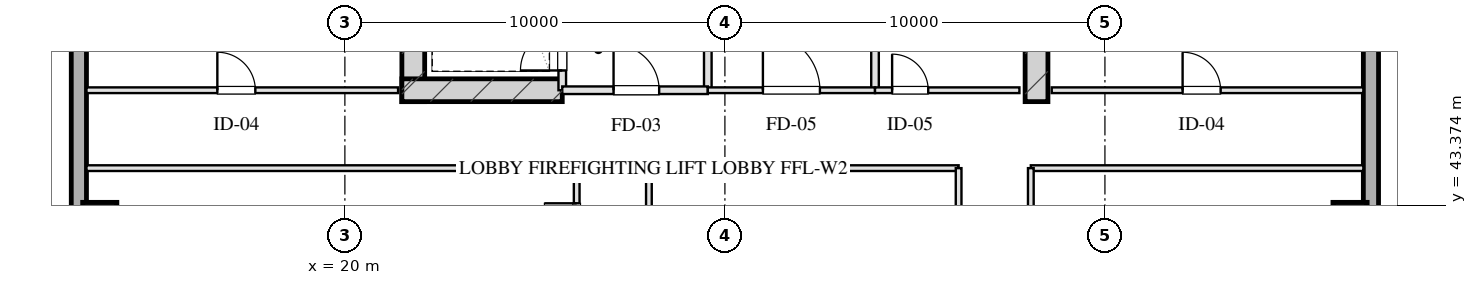
"""IFC4 building model, lengths in metres.
Left out: names, types, materials, properties, quantities, classifications, styles, units other than length and angle.
Written with IfcOpenShell. Run it as: python <this file> out.ifc"""

import sys

from ifc_helpers import new_model, si_unit, direction, frame, frame_2d, origin, origin_2d, place, context, subcontext, project, spatial, rectangle, hollow_rectangle, extrude, element, fill, save


model = new_model("IFC4")
c1 = context("Model", 3, precision=1e-05, world=origin(), true_north=direction((0.0, 1.0)))
c2 = subcontext(c1, "Body", "Model", "MODEL_VIEW")
j1 = project(units=[si_unit("LENGTHUNIT", "METRE"), si_unit("PLANEANGLEUNIT", "RADIAN")], contexts=[c1])
p1 = place(None, origin())
s1 = spatial("IfcSite", under=j1, at=p1, CompositionType="ELEMENT")
p2 = place(p1, origin())
s2 = spatial("IfcBuilding", under=s1, at=p2, CompositionType="ELEMENT")
p3 = place(p2, frame((0.0, 0.0, 177.1)))
s3 = spatial("IfcBuildingStorey", under=s2, at=p3, CompositionType="ELEMENT", Elevation=177.1)
for number, where, z_axis, x_axis in (
    (1, (21.8, 46.1, 0.0), (0.0, 0.0, 1.0), (0.0, 1.0, 0.0)),
    (2, (38.2, 46.1, 0.0), (0.0, 0.0, 1.0), (0.0, 1.0, 0.0)),
):
    element("IfcWall", number, at=place(p3, frame(where, z_axis=z_axis, x_axis=x_axis)), inside=s3, PredefinedType="SHEAR", context=c2, shape_type="SweptSolid", body=[
        extrude(rectangle(XDim=9.48, YDim=0.6, at=frame_2d((4.74, 0.0))), origin(), (0.0, 0.0, 1.0), 3.45),
    ])
p4 = place(p3, frame((21.5, 46.4, 0.0), z_axis=(0.0, 0.0, 1.0), x_axis=(1.0, 0.0, 0.0)))
e3 = element("IfcWall", 3, at=p4, inside=s3, PredefinedType="SHEAR", context=c2, shape_type="SweptSolid", body=[
    extrude(rectangle(XDim=4.22, YDim=0.6, at=frame_2d((2.11, 0.0))), origin(), (0.0, 0.0, 1.0), 3.45),
])
for number, where, z_axis, x_axis in (
    (4, (13.55, 43.0, 0.0), (0.0, 0.0, 1.0), (1.0, 0.0, 0.0)),
    (5, (46.45, 43.0, 0.0), (0.0, 0.0, 1.0), (1.0, 0.0, 0.0)),
):
    element("IfcColumn", number, at=place(p3, frame(where, z_axis=z_axis, x_axis=x_axis)), inside=s3, PredefinedType="COLUMN", context=c2, shape_type="SweptSolid", body=[
        extrude(hollow_rectangle(XDim=0.9, YDim=0.9, WallThickness=0.032, at=origin_2d()), origin(), (0.0, 0.0, 1.0), 3.451),
    ])
p5 = place(p3, frame((13.0, 10.8, 0.0), z_axis=(0.0, 0.0, 1.0), x_axis=(0.0, 1.0, 0.0)))
e6 = element("IfcWall", 6, at=p5, inside=s3, PredefinedType="SOLIDWALL", context=c2, shape_type="SweptSolid", body=[
    extrude(rectangle(XDim=46.4, YDim=0.4, at=frame_2d((23.2, 0.0))), origin(), (0.0, 0.0, 1.0), 2.61),
])
p6 = place(p5, frame((15.75, 0.0, 0.75)))
e7 = element("IfcOpeningElement", 7, at=p6, cuts=e6, PredefinedType="OPENING", context=c2, shape_type="SweptSolid", body=[
    extrude(rectangle(XDim=2.1, YDim=1.46, at=frame_2d((1.05, 0.73))), frame((0.0, 0.21, 0.0), z_axis=(0.0, -1.0, 0.0), x_axis=(1.0, 0.0, 0.0)), (0.0, 0.0, 1.0), 0.42),
])
p7 = place(p5, frame((19.55, 0.0, 0.75)))
e8 = element("IfcOpeningElement", 8, at=p7, cuts=e6, PredefinedType="OPENING", context=c2, shape_type="SweptSolid", body=[
    extrude(rectangle(XDim=2.1, YDim=1.46, at=frame_2d((1.05, 0.73))), frame((0.0, 0.21, 0.0), z_axis=(0.0, -1.0, 0.0), x_axis=(1.0, 0.0, 0.0)), (0.0, 0.0, 1.0), 0.42),
])
p8 = place(p5, frame((28.45, 0.0, 0.0)))
e9 = element("IfcOpeningElement", 9, at=p8, cuts=e6, PredefinedType="OPENING", context=c2, shape_type="SweptSolid", body=[
    extrude(rectangle(XDim=1.1, YDim=2.15, at=frame_2d((0.55, 1.075))), frame((0.0, 0.21, 0.0), z_axis=(0.0, -1.0, 0.0), x_axis=(1.0, 0.0, 0.0)), (0.0, 0.0, 1.0), 0.42),
])
p9 = place(p3, frame((47.0, 57.2, 0.0), z_axis=(0.0, 0.0, 1.0), x_axis=(0.0, -1.0, 0.0)))
e10 = element("IfcWall", 10, at=p9, inside=s3, PredefinedType="SOLIDWALL", context=c2, shape_type="SweptSolid", body=[
    extrude(rectangle(XDim=46.4, YDim=0.4, at=frame_2d((23.2, 0.0))), origin(), (0.0, 0.0, 1.0), 2.61),
])
p10 = place(p9, frame((28.55, 0.0, 0.75)))
e11 = element("IfcOpeningElement", 11, at=p10, cuts=e10, PredefinedType="OPENING", context=c2, shape_type="SweptSolid", body=[
    extrude(rectangle(XDim=2.1, YDim=1.46, at=frame_2d((1.05, 0.73))), frame((0.0, 0.21, 0.0), z_axis=(0.0, -1.0, 0.0), x_axis=(1.0, 0.0, 0.0)), (0.0, 0.0, 1.0), 0.42),
])
p11 = place(p9, frame((24.75, 0.0, 0.75)))
e12 = element("IfcOpeningElement", 12, at=p11, cuts=e10, PredefinedType="OPENING", context=c2, shape_type="SweptSolid", body=[
    extrude(rectangle(XDim=2.1, YDim=1.46, at=frame_2d((1.05, 0.73))), frame((0.0, 0.21, 0.0), z_axis=(0.0, -1.0, 0.0), x_axis=(1.0, 0.0, 0.0)), (0.0, 0.0, 1.0), 0.42),
])
p12 = place(p9, frame((18.25, 0.0, 0.0)))
e13 = element("IfcOpeningElement", 13, at=p12, cuts=e10, PredefinedType="OPENING", context=c2, shape_type="SweptSolid", body=[
    extrude(rectangle(XDim=1.1, YDim=2.15, at=frame_2d((0.55, 1.075))), frame((0.0, 0.21, 0.0), z_axis=(0.0, -1.0, 0.0), x_axis=(1.0, 0.0, 0.0)), (0.0, 0.0, 1.0), 0.42),
])
p13 = place(p3, frame((25.72, 46.4, 0.0), z_axis=(0.0, 0.0, 1.0), x_axis=(0.0, 1.0, 0.0)))
e14 = element("IfcWall", 14, at=p13, inside=s3, PredefinedType="PARTITIONING", context=c2, shape_type="SweptSolid", body=[
    extrude(rectangle(XDim=1.9, YDim=0.2, at=frame_2d((0.95, 0.0))), origin(), (0.0, 0.0, 1.0), 3.175),
])
p14 = place(p13, frame((0.52, 0.0, 0.0)))
e15 = element("IfcOpeningElement", 15, at=p14, cuts=e14, PredefinedType="OPENING", context=c2, shape_type="SweptSolid", body=[
    extrude(rectangle(XDim=1.1, YDim=2.05, at=frame_2d((0.55, 1.025))), frame((0.0, 0.11, 0.0), z_axis=(0.0, -1.0, 0.0), x_axis=(1.0, 0.0, 0.0)), (0.0, 0.0, 1.0), 0.22),
])
p15 = place(p3, frame((29.55, 46.4, 0.0), z_axis=(0.0, 0.0, 1.0), x_axis=(0.0, 1.0, 0.0)))
e16 = element("IfcWall", 16, at=p15, inside=s3, PredefinedType="PARTITIONING", context=c2, shape_type="SweptSolid", body=[
    extrude(rectangle(XDim=8.43, YDim=0.2, at=frame_2d((4.215, 0.0))), origin(), (0.0, 0.0, 1.0), 3.175),
])
p16 = place(p3, frame((25.72, 46.4, 0.0), z_axis=(0.0, 0.0, 1.0), x_axis=(1.0, 0.0, 0.0)))
e17 = element("IfcWall", 17, at=p16, inside=s3, PredefinedType="PARTITIONING", context=c2, shape_type="SweptSolid", body=[
    extrude(rectangle(XDim=3.83, YDim=0.2, at=frame_2d((1.915, 0.0))), origin(), (0.0, 0.0, 1.0), 3.175),
])
p17 = place(p16, frame((1.35, 0.0, 0.0)))
e18 = element("IfcOpeningElement", 18, at=p17, cuts=e17, PredefinedType="OPENING", context=c2, shape_type="SweptSolid", body=[
    extrude(rectangle(XDim=1.2, YDim=2.05, at=frame_2d((0.6, 1.025))), frame((0.0, 0.11, 0.0), z_axis=(0.0, -1.0, 0.0), x_axis=(1.0, 0.0, 0.0)), (0.0, 0.0, 1.0), 0.22),
])
p18 = place(p3, frame((33.95, 46.4, 0.0), z_axis=(0.0, 0.0, 1.0), x_axis=(0.0, 1.0, 0.0)))
e19 = element("IfcWall", 19, at=p18, inside=s3, PredefinedType="PARTITIONING", context=c2, shape_type="SweptSolid", body=[
    extrude(rectangle(XDim=8.43, YDim=0.2, at=frame_2d((4.215, 0.0))), origin(), (0.0, 0.0, 1.0), 3.175),
])
p19 = place(p3, frame((29.55, 46.4, 0.0), z_axis=(0.0, 0.0, 1.0), x_axis=(1.0, 0.0, 0.0)))
e20 = element("IfcWall", 20, at=p19, inside=s3, PredefinedType="PARTITIONING", context=c2, shape_type="SweptSolid", body=[
    extrude(rectangle(XDim=4.4, YDim=0.15, at=frame_2d((2.2, 0.0))), origin(), (0.0, 0.0, 1.0), 3.175),
])
p20 = place(p19, frame((1.45, 0.0, 0.0)))
e21 = element("IfcOpeningElement", 21, at=p20, cuts=e20, PredefinedType="OPENING", context=c2, shape_type="SweptSolid", body=[
    extrude(rectangle(XDim=1.5, YDim=2.05, at=frame_2d((0.75, 1.025))), frame((0.0, 0.085, 0.0), z_axis=(0.0, -1.0, 0.0), x_axis=(1.0, 0.0, 0.0)), (0.0, 0.0, 1.0), 0.17),
])
p21 = place(p3, frame((33.95, 46.4, 0.0), z_axis=(0.0, 0.0, 1.0), x_axis=(1.0, 0.0, 0.0)))
e22 = element("IfcWall", 22, at=p21, inside=s3, PredefinedType="PARTITIONING", context=c2, shape_type="SweptSolid", body=[
    extrude(rectangle(XDim=3.8, YDim=0.15, at=frame_2d((1.9, 0.0))), origin(), (0.0, 0.0, 1.0), 3.175),
])
p22 = place(p21, frame((0.45, 0.0, 0.0)))
e23 = element("IfcOpeningElement", 23, at=p22, cuts=e22, PredefinedType="OPENING", context=c2, shape_type="SweptSolid", body=[
    extrude(rectangle(XDim=0.95, YDim=2.05, at=frame_2d((0.475, 1.025))), frame((0.0, 0.085, 0.0), z_axis=(0.0, -1.0, 0.0), x_axis=(1.0, 0.0, 0.0)), (0.0, 0.0, 1.0), 0.17),
])
p23 = place(p3, frame((13.2, 46.4, 0.0), z_axis=(0.0, 0.0, 1.0), x_axis=(1.0, 0.0, 0.0)))
e24 = element("IfcWall", 24, at=p23, inside=s3, PredefinedType="PARTITIONING", context=c2, shape_type="SweptSolid", body=[
    extrude(rectangle(XDim=8.2, YDim=0.15, at=frame_2d((4.1, 0.0))), origin(), (0.0, 0.0, 1.0), 3.175),
])
p24 = place(p23, frame((3.444, 0.0, 0.0)))
e25 = element("IfcOpeningElement", 25, at=p24, cuts=e24, PredefinedType="OPENING", context=c2, shape_type="SweptSolid", body=[
    extrude(rectangle(XDim=1.0, YDim=2.05, at=frame_2d((0.5, 1.025))), frame((0.0, 0.085, 0.0), z_axis=(0.0, -1.0, 0.0), x_axis=(1.0, 0.0, 0.0)), (0.0, 0.0, 1.0), 0.17),
])
p25 = place(p3, frame((38.6, 46.4, 0.0), z_axis=(0.0, 0.0, 1.0), x_axis=(1.0, 0.0, 0.0)))
e26 = element("IfcWall", 26, at=p25, inside=s3, PredefinedType="PARTITIONING", context=c2, shape_type="SweptSolid", body=[
    extrude(rectangle(XDim=8.2, YDim=0.15, at=frame_2d((4.1, 0.0))), origin(), (0.0, 0.0, 1.0), 3.175),
])
p26 = place(p25, frame((3.444, 0.0, 0.0)))
e27 = element("IfcOpeningElement", 27, at=p26, cuts=e26, PredefinedType="OPENING", context=c2, shape_type="SweptSolid", body=[
    extrude(rectangle(XDim=1.0, YDim=2.05, at=frame_2d((0.5, 1.025))), frame((0.0, 0.085, 0.0), z_axis=(0.0, -1.0, 0.0), x_axis=(1.0, 0.0, 0.0)), (0.0, 0.0, 1.0), 0.17),
])
p27 = place(p3, frame((13.2, 44.35, 0.0), z_axis=(0.0, 0.0, 1.0), x_axis=(1.0, 0.0, 0.0)))
e28 = element("IfcWall", 28, at=p27, inside=s3, PredefinedType="PARTITIONING", context=c2, shape_type="SweptSolid", body=[
    extrude(rectangle(XDim=12.9, YDim=0.15, at=frame_2d((6.45, 0.0))), origin(), (0.0, 0.0, 1.0), 3.175),
])
p28 = place(p3, frame((28.0, 44.35, 0.0), z_axis=(0.0, 0.0, 1.0), x_axis=(1.0, 0.0, 0.0)))
e29 = element("IfcWall", 29, at=p28, inside=s3, PredefinedType="PARTITIONING", context=c2, shape_type="SweptSolid", body=[
    extrude(rectangle(XDim=8.15, YDim=0.15, at=frame_2d((4.075, 0.0))), origin(), (0.0, 0.0, 1.0), 3.175),
])
p29 = place(p3, frame((38.05, 44.35, 0.0), z_axis=(0.0, 0.0, 1.0), x_axis=(1.0, 0.0, 0.0)))
e30 = element("IfcWall", 30, at=p29, inside=s3, PredefinedType="PARTITIONING", context=c2, shape_type="SweptSolid", body=[
    extrude(rectangle(XDim=8.75, YDim=0.15, at=frame_2d((4.375, 0.0))), origin(), (0.0, 0.0, 1.0), 3.175),
])
p30 = place(p3, frame((26.1, 23.65, 0.0), z_axis=(0.0, 0.0, 1.0), x_axis=(0.0, 1.0, 0.0)))
e31 = element("IfcWall", 31, at=p30, inside=s3, PredefinedType="PARTITIONING", context=c2, shape_type="SweptSolid", body=[
    extrude(rectangle(XDim=20.7, YDim=0.15, at=frame_2d((10.35, 0.0))), origin(), (0.0, 0.0, 1.0), 3.175),
])
p31 = place(p30, frame((0.775, 0.0, 0.0)))
e32 = element("IfcOpeningElement", 32, at=p31, cuts=e31, PredefinedType="OPENING", context=c2, shape_type="SweptSolid", body=[
    extrude(rectangle(XDim=1.0, YDim=2.05, at=frame_2d((0.5, 1.025))), frame((0.0, 0.085, 0.0), z_axis=(0.0, -1.0, 0.0), x_axis=(1.0, 0.0, 0.0)), (0.0, 0.0, 1.0), 0.17),
])
p32 = place(p30, frame((3.95, 0.0, 0.0)))
e33 = element("IfcOpeningElement", 33, at=p32, cuts=e31, PredefinedType="OPENING", context=c2, shape_type="SweptSolid", body=[
    extrude(rectangle(XDim=1.0, YDim=2.05, at=frame_2d((0.5, 1.025))), frame((0.0, 0.085, 0.0), z_axis=(0.0, -1.0, 0.0), x_axis=(1.0, 0.0, 0.0)), (0.0, 0.0, 1.0), 0.17),
])
p33 = place(p30, frame((7.51, 0.0, 0.0)))
e34 = element("IfcOpeningElement", 34, at=p33, cuts=e31, PredefinedType="OPENING", context=c2, shape_type="SweptSolid", body=[
    extrude(rectangle(XDim=1.05, YDim=2.05, at=frame_2d((0.525, 1.025))), frame((0.0, 0.085, 0.0), z_axis=(0.0, -1.0, 0.0), x_axis=(1.0, 0.0, 0.0)), (0.0, 0.0, 1.0), 0.17),
])
p34 = place(p30, frame((11.51, 0.0, 0.0)))
e35 = element("IfcOpeningElement", 35, at=p34, cuts=e31, PredefinedType="OPENING", context=c2, shape_type="SweptSolid", body=[
    extrude(rectangle(XDim=1.0, YDim=2.05, at=frame_2d((0.5, 1.025))), frame((0.0, 0.085, 0.0), z_axis=(0.0, -1.0, 0.0), x_axis=(1.0, 0.0, 0.0)), (0.0, 0.0, 1.0), 0.17),
])
p35 = place(p30, frame((15.75, 0.0, 0.0)))
e36 = element("IfcOpeningElement", 36, at=p35, cuts=e31, PredefinedType="OPENING", context=c2, shape_type="SweptSolid", body=[
    extrude(rectangle(XDim=1.0, YDim=2.05, at=frame_2d((0.5, 1.025))), frame((0.0, 0.085, 0.0), z_axis=(0.0, -1.0, 0.0), x_axis=(1.0, 0.0, 0.0)), (0.0, 0.0, 1.0), 0.17),
])
p36 = place(p30, frame((18.925, 0.0, 0.0)))
e37 = element("IfcOpeningElement", 37, at=p36, cuts=e31, PredefinedType="OPENING", context=c2, shape_type="SweptSolid", body=[
    extrude(rectangle(XDim=0.85, YDim=2.05, at=frame_2d((0.425, 1.025))), frame((0.0, 0.085, 0.0), z_axis=(0.0, -1.0, 0.0), x_axis=(1.0, 0.0, 0.0)), (0.0, 0.0, 1.0), 0.17),
])
p37 = place(p3, frame((28.0, 23.65, 0.0), z_axis=(0.0, 0.0, 1.0), x_axis=(0.0, 1.0, 0.0)))
e38 = element("IfcWall", 38, at=p37, inside=s3, PredefinedType="PARTITIONING", context=c2, shape_type="SweptSolid", body=[
    extrude(rectangle(XDim=20.7, YDim=0.15, at=frame_2d((10.35, 0.0))), origin(), (0.0, 0.0, 1.0), 3.175),
])
p38 = place(p37, frame((2.857, 0.0, 0.0)))
e39 = element("IfcOpeningElement", 39, at=p38, cuts=e38, PredefinedType="OPENING", context=c2, shape_type="SweptSolid", body=[
    extrude(rectangle(XDim=1.1, YDim=2.05, at=frame_2d((0.55, 1.025))), frame((0.0, 0.085, 0.0), z_axis=(0.0, -1.0, 0.0), x_axis=(1.0, 0.0, 0.0)), (0.0, 0.0, 1.0), 0.17),
])
p39 = place(p37, frame((17.208, 0.0, 0.0)))
e40 = element("IfcOpeningElement", 40, at=p39, cuts=e38, PredefinedType="OPENING", context=c2, shape_type="SweptSolid", body=[
    extrude(rectangle(XDim=1.1, YDim=2.05, at=frame_2d((0.55, 1.025))), frame((0.0, 0.085, 0.0), z_axis=(0.0, -1.0, 0.0), x_axis=(1.0, 0.0, 0.0)), (0.0, 0.0, 1.0), 0.17),
])
p40 = place(p3, frame((36.15, 23.65, 0.0), z_axis=(0.0, 0.0, 1.0), x_axis=(0.0, 1.0, 0.0)))
e41 = element("IfcWall", 41, at=p40, inside=s3, PredefinedType="PARTITIONING", context=c2, shape_type="SweptSolid", body=[
    extrude(rectangle(XDim=20.7, YDim=0.15, at=frame_2d((10.35, 0.0))), origin(), (0.0, 0.0, 1.0), 3.175),
])
p41 = place(p40, frame((9.71, 0.0, 0.0)))
e42 = element("IfcOpeningElement", 42, at=p41, cuts=e41, PredefinedType="OPENING", context=c2, shape_type="SweptSolid", body=[
    extrude(rectangle(XDim=1.1, YDim=2.05, at=frame_2d((0.55, 1.025))), frame((0.0, 0.085, 0.0), z_axis=(0.0, -1.0, 0.0), x_axis=(1.0, 0.0, 0.0)), (0.0, 0.0, 1.0), 0.17),
])
p42 = place(p3, frame((38.05, 23.65, 0.0), z_axis=(0.0, 0.0, 1.0), x_axis=(0.0, 1.0, 0.0)))
e43 = element("IfcWall", 43, at=p42, inside=s3, PredefinedType="PARTITIONING", context=c2, shape_type="SweptSolid", body=[
    extrude(rectangle(XDim=20.7, YDim=0.15, at=frame_2d((10.35, 0.0))), origin(), (0.0, 0.0, 1.0), 3.175),
])
p43 = place(p42, frame((4.148, 0.0, 0.0)))
e44 = element("IfcOpeningElement", 44, at=p43, cuts=e43, PredefinedType="OPENING", context=c2, shape_type="SweptSolid", body=[
    extrude(rectangle(XDim=1.05, YDim=2.05, at=frame_2d((0.525, 1.025))), frame((0.0, 0.085, 0.0), z_axis=(0.0, -1.0, 0.0), x_axis=(1.0, 0.0, 0.0)), (0.0, 0.0, 1.0), 0.17),
])
p44 = place(p42, frame((14.499, 0.0, 0.0)))
e45 = element("IfcOpeningElement", 45, at=p44, cuts=e43, PredefinedType="OPENING", context=c2, shape_type="SweptSolid", body=[
    extrude(rectangle(XDim=1.0, YDim=2.05, at=frame_2d((0.5, 1.025))), frame((0.0, 0.085, 0.0), z_axis=(0.0, -1.0, 0.0), x_axis=(1.0, 0.0, 0.0)), (0.0, 0.0, 1.0), 0.17),
])
p45 = place(p14, origin())
e46 = element("IfcDoor", 46, at=p45, inside=s3, OperationType="SINGLE_SWING_LEFT", PredefinedType="DOOR", context=c2, shape_type="SweptSolid", body=[
    extrude(rectangle(XDim=1.1, YDim=2.05, at=frame_2d((0.55, 1.025))), frame((0.0, 0.025, 0.0), z_axis=(0.0, -1.0, 0.0), x_axis=(1.0, 0.0, 0.0)), (0.0, 0.0, 1.0), 0.05),
])
fill(e15, e46)
p46 = place(p17, origin())
e47 = element("IfcDoor", 47, at=p46, inside=s3, OperationType="SINGLE_SWING_LEFT", PredefinedType="DOOR", context=c2, shape_type="SweptSolid", body=[
    extrude(rectangle(XDim=1.2, YDim=2.05, at=frame_2d((0.6, 1.025))), frame((0.0, 0.025, 0.0), z_axis=(0.0, -1.0, 0.0), x_axis=(1.0, 0.0, 0.0)), (0.0, 0.0, 1.0), 0.05),
])
fill(e18, e47)
p47 = place(p20, origin())
e48 = element("IfcDoor", 48, at=p47, inside=s3, OperationType="SINGLE_SWING_LEFT", PredefinedType="DOOR", context=c2, shape_type="SweptSolid", body=[
    extrude(rectangle(XDim=1.5, YDim=2.05, at=frame_2d((0.75, 1.025))), frame((0.0, 0.025, 0.0), z_axis=(0.0, -1.0, 0.0), x_axis=(1.0, 0.0, 0.0)), (0.0, 0.0, 1.0), 0.05),
])
fill(e21, e48)
p48 = place(p22, origin())
e49 = element("IfcDoor", 49, at=p48, inside=s3, OperationType="SINGLE_SWING_LEFT", PredefinedType="DOOR", context=c2, shape_type="SweptSolid", body=[
    extrude(rectangle(XDim=0.95, YDim=2.05, at=frame_2d((0.475, 1.025))), frame((0.0, 0.025, 0.0), z_axis=(0.0, -1.0, 0.0), x_axis=(1.0, 0.0, 0.0)), (0.0, 0.0, 1.0), 0.05),
])
fill(e23, e49)
p49 = place(p24, origin())
e50 = element("IfcDoor", 50, at=p49, inside=s3, OperationType="SINGLE_SWING_LEFT", PredefinedType="DOOR", context=c2, shape_type="SweptSolid", body=[
    extrude(rectangle(XDim=1.0, YDim=2.05, at=frame_2d((0.5, 1.025))), frame((0.0, 0.025, 0.0), z_axis=(0.0, -1.0, 0.0), x_axis=(1.0, 0.0, 0.0)), (0.0, 0.0, 1.0), 0.05),
])
fill(e25, e50)
p50 = place(p26, origin())
e51 = element("IfcDoor", 51, at=p50, inside=s3, OperationType="SINGLE_SWING_LEFT", PredefinedType="DOOR", context=c2, shape_type="SweptSolid", body=[
    extrude(rectangle(XDim=1.0, YDim=2.05, at=frame_2d((0.5, 1.025))), frame((0.0, 0.025, 0.0), z_axis=(0.0, -1.0, 0.0), x_axis=(1.0, 0.0, 0.0)), (0.0, 0.0, 1.0), 0.05),
])
fill(e27, e51)
p51 = place(p36, origin())
e52 = element("IfcDoor", 52, at=p51, inside=s3, OperationType="SINGLE_SWING_RIGHT", PredefinedType="DOOR", context=c2, shape_type="SweptSolid", body=[
    extrude(rectangle(XDim=0.85, YDim=2.05, at=frame_2d((0.425, 1.025))), frame((0.0, 0.025, 0.0), z_axis=(0.0, -1.0, 0.0), x_axis=(1.0, 0.0, 0.0)), (0.0, 0.0, 1.0), 0.05),
])
fill(e37, e52)
save(model, sys.argv[1])
